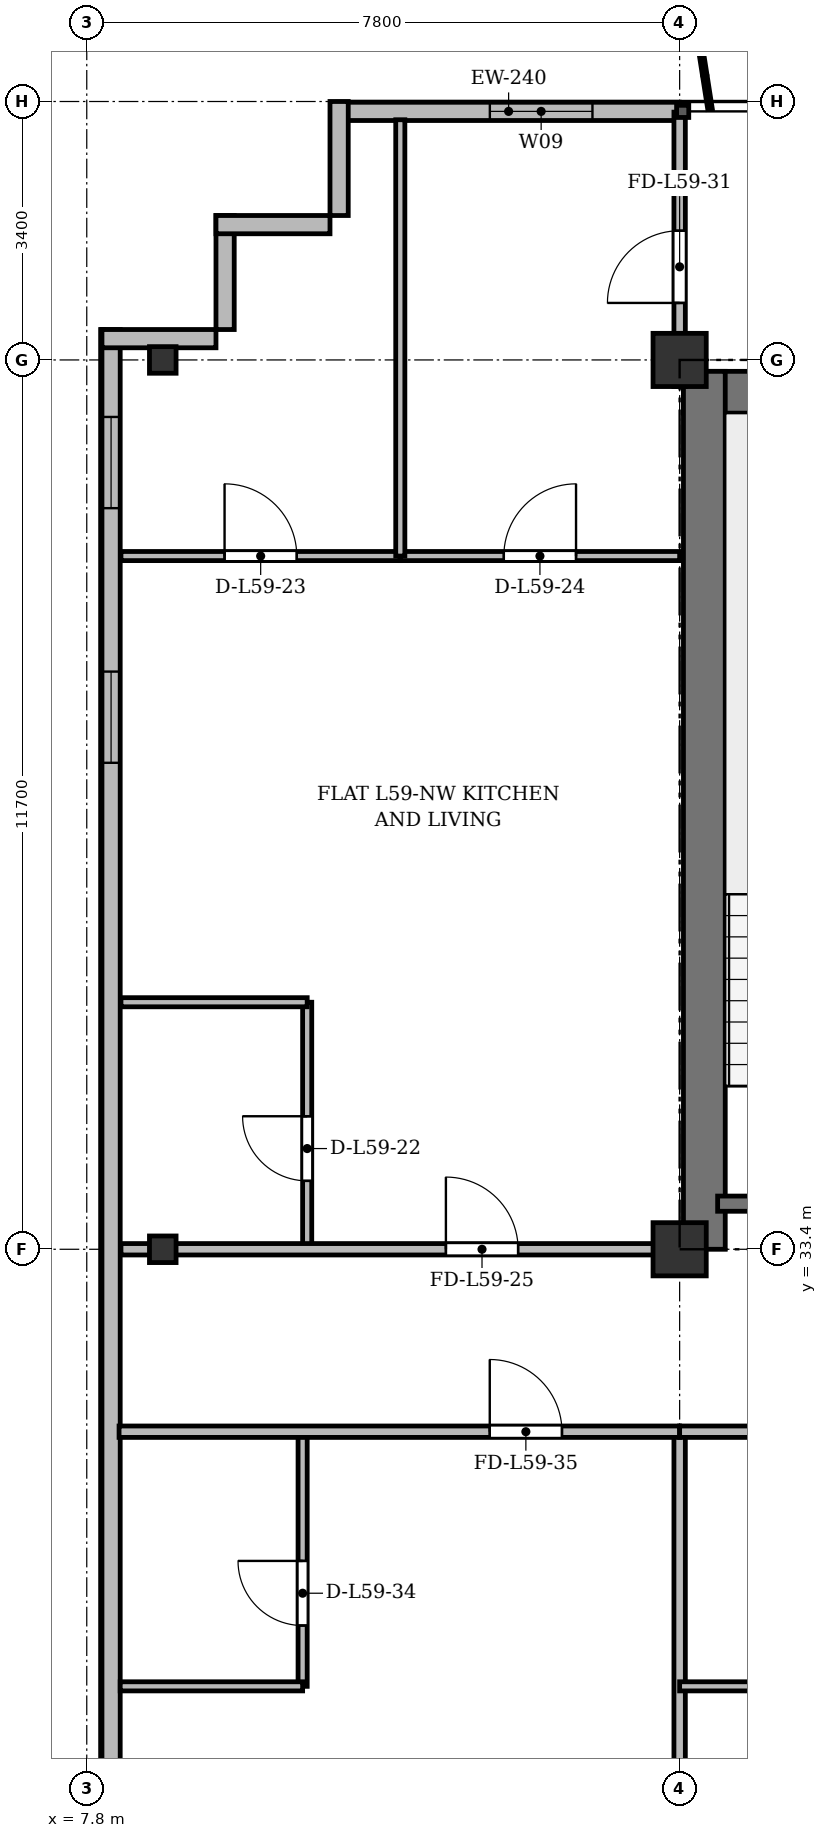
"""IFC4 building model, lengths in metres.
Left out: names, types, materials, properties, quantities, classifications, styles, units other than length and angle.
Written with IfcOpenShell. Run it as: python <this file> out.ifc"""

import sys

from ifc_helpers import new_model, si_unit, direction, frame, frame_2d, origin, origin_2d, place, context, subcontext, project, spatial, rectangle, i_section, extrude, source, transform, mapped, element, fill, save


model = new_model("IFC4")
c1 = context("Model", 3, precision=1e-05, world=origin(), true_north=direction((0.0, 1.0)))
c2 = subcontext(c1, "Body", "Model", "MODEL_VIEW")
j1 = project(units=[si_unit("LENGTHUNIT", "METRE"), si_unit("PLANEANGLEUNIT", "RADIAN")], contexts=[c1])
p1 = place(None, origin())
s1 = spatial("IfcSite", under=j1, at=p1, CompositionType="ELEMENT")
p2 = place(p1, origin())
s2 = spatial("IfcBuilding", under=s1, at=p2, CompositionType="ELEMENT")
p3 = place(p2, frame((0.0, 0.0, 226.5)))
s3 = spatial("IfcBuildingStorey", under=s2, at=p3, CompositionType="ELEMENT", Elevation=226.5)
m1 = source(origin(), c2, "Body", "SweptSolid", [
    extrude(i_section(OverallWidth=0.35, OverallDepth=0.35, WebThickness=0.018, FlangeThickness=0.028, at=origin_2d()), origin(), (0.0, 0.0, 1.0), 3.6),
])
for number, where, z_axis, x_axis in (
    (1, (8.8, 33.4, 0.0), (0.0, 0.0, 1.0), (1.0, 0.0, 0.0)),
    (2, (8.8, 45.1, 0.0), (0.0, 0.0, 1.0), (1.0, 0.0, 0.0)),
):
    element("IfcColumn", number, at=place(p3, frame(where, z_axis=z_axis, x_axis=x_axis)), inside=s3, PredefinedType="COLUMN", context=c2, shape_type="MappedRepresentation", body=[
        mapped(m1, transform((0.0, 0.0, 0.0), x_axis=(1.0, 0.0, 0.0), y_axis=(0.0, 1.0, 0.0), z_axis=(0.0, 0.0, 1.0), scale=1.0)),
    ])
m2 = source(origin(), c2, "Body", "SweptSolid", [
    extrude(rectangle(XDim=0.7, YDim=0.7, at=origin_2d()), origin(), (0.0, 0.0, 1.0), 3.6),
])
for number, where, z_axis, x_axis in (
    (3, (15.6, 33.4, 0.0), (0.0, 0.0, 1.0), (1.0, 0.0, 0.0)),
    (4, (15.6, 45.1, 0.0), (0.0, 0.0, 1.0), (1.0, 0.0, 0.0)),
):
    element("IfcColumn", number, at=place(p3, frame(where, z_axis=z_axis, x_axis=x_axis)), inside=s3, PredefinedType="COLUMN", context=c2, shape_type="MappedRepresentation", body=[
        mapped(m2, transform((0.0, 0.0, 0.0), x_axis=(1.0, 0.0, 0.0), y_axis=(0.0, 1.0, 0.0), z_axis=(0.0, 0.0, 1.0), scale=1.0)),
    ])
p4 = place(p3, frame((11.1, 48.37, 0.0), z_axis=(0.0, 0.0, 1.0), x_axis=(1.0, 0.0, 0.0)))
e5 = element("IfcWall", 5, at=p4, inside=s3, PredefinedType="SOLIDWALL", context=c2, shape_type="SweptSolid", body=[
    extrude(rectangle(XDim=4.5, YDim=0.24, at=frame_2d((2.25, 0.0))), origin(), (0.0, 0.0, 1.0), 3.36),
])
p5 = place(p4, frame((2.003, 0.0, 0.9)))
e6 = element("IfcOpeningElement", 6, at=p5, cuts=e5, PredefinedType="OPENING", context=c2, shape_type="SweptSolid", body=[
    extrude(rectangle(XDim=1.35, YDim=1.5, at=frame_2d((0.675, 0.75))), frame((0.0, 0.13, 0.0), z_axis=(0.0, -1.0, 0.0), x_axis=(1.0, 0.0, 0.0)), (0.0, 0.0, 1.0), 0.26),
])
p6 = place(p3, frame((8.12, 6.4, 0.0), z_axis=(0.0, 0.0, 1.0), x_axis=(0.0, 1.0, 0.0)))
e7 = element("IfcWall", 7, at=p6, inside=s3, PredefinedType="SOLIDWALL", context=c2, shape_type="SweptSolid", body=[
    extrude(rectangle(XDim=39.1, YDim=0.24, at=frame_2d((19.55, 0.0))), origin(), (0.0, 0.0, 1.0), 3.36),
])
p7 = place(p6, frame((1.45, 0.0, 0.92)))
e8 = element("IfcOpeningElement", 8, at=p7, cuts=e7, PredefinedType="OPENING", context=c2, shape_type="SweptSolid", body=[
    extrude(rectangle(XDim=1.2, YDim=1.65, at=frame_2d((0.6, 0.825))), frame((0.0, 0.13, 0.0), z_axis=(0.0, -1.0, 0.0), x_axis=(1.0, 0.0, 0.0)), (0.0, 0.0, 1.0), 0.26),
])
p8 = place(p6, frame((3.8, 0.0, 0.92)))
e9 = element("IfcOpeningElement", 9, at=p8, cuts=e7, PredefinedType="OPENING", context=c2, shape_type="SweptSolid", body=[
    extrude(rectangle(XDim=2.4, YDim=2.1, at=frame_2d((1.2, 1.05))), frame((0.0, 0.13, 0.0), z_axis=(0.0, -1.0, 0.0), x_axis=(1.0, 0.0, 0.0)), (0.0, 0.0, 1.0), 0.26),
])
p9 = place(p6, frame((8.0, 0.0, 0.92)))
e10 = element("IfcOpeningElement", 10, at=p9, cuts=e7, PredefinedType="OPENING", context=c2, shape_type="SweptSolid", body=[
    extrude(rectangle(XDim=2.4, YDim=2.1, at=frame_2d((1.2, 1.05))), frame((0.0, 0.13, 0.0), z_axis=(0.0, -1.0, 0.0), x_axis=(1.0, 0.0, 0.0)), (0.0, 0.0, 1.0), 0.26),
])
p10 = place(p6, frame((15.2, 0.0, 0.92)))
e11 = element("IfcOpeningElement", 11, at=p10, cuts=e7, PredefinedType="OPENING", context=c2, shape_type="SweptSolid", body=[
    extrude(rectangle(XDim=2.4, YDim=2.1, at=frame_2d((1.2, 1.05))), frame((0.0, 0.13, 0.0), z_axis=(0.0, -1.0, 0.0), x_axis=(1.0, 0.0, 0.0)), (0.0, 0.0, 1.0), 0.26),
])
p11 = place(p6, frame((33.4, 0.0, 0.92)))
e12 = element("IfcOpeningElement", 12, at=p11, cuts=e7, PredefinedType="OPENING", context=c2, shape_type="SweptSolid", body=[
    extrude(rectangle(XDim=1.2, YDim=1.65, at=frame_2d((0.6, 0.825))), frame((0.0, 0.13, 0.0), z_axis=(0.0, -1.0, 0.0), x_axis=(1.0, 0.0, 0.0)), (0.0, 0.0, 1.0), 0.26),
])
p12 = place(p6, frame((36.75, 0.0, 0.92)))
e13 = element("IfcOpeningElement", 13, at=p12, cuts=e7, PredefinedType="OPENING", context=c2, shape_type="SweptSolid", body=[
    extrude(rectangle(XDim=1.2, YDim=1.65, at=frame_2d((0.6, 0.825))), frame((0.0, 0.13, 0.0), z_axis=(0.0, -1.0, 0.0), x_axis=(1.0, 0.0, 0.0)), (0.0, 0.0, 1.0), 0.26),
])
for number, where, z_axis, x_axis in (
    (14, (8.0, 45.38, 0.0), (0.0, 0.0, 1.0), (1.0, 0.0, 0.0)),
    (15, (9.62, 45.5, 0.0), (0.0, 0.0, 1.0), (0.0, 1.0, 0.0)),
    (16, (9.5, 46.88, 0.0), (0.0, 0.0, 1.0), (1.0, 0.0, 0.0)),
    (17, (11.12, 47.0, 0.0), (0.0, 0.0, 1.0), (0.0, 1.0, 0.0)),
):
    element("IfcWall", number, at=place(p3, frame(where, z_axis=z_axis, x_axis=x_axis)), inside=s3, PredefinedType="SOLIDWALL", context=c2, shape_type="SweptSolid", body=[
        extrude(rectangle(XDim=1.5, YDim=0.24, at=frame_2d((0.75, 0.0))), origin(), (0.0, 0.0, 1.0), 3.36),
    ])
p13 = place(p3, frame((15.65, 44.675, 0.0), z_axis=(0.0, 0.0, 1.0), x_axis=(1.0, 0.0, 0.0)))
e18 = element("IfcWall", 18, at=p13, inside=s3, PredefinedType="SHEAR", context=c2, shape_type="SweptSolid", body=[
    extrude(rectangle(XDim=43.1, YDim=0.55, at=frame_2d((21.55, 0.0))), origin(), (0.0, 0.0, 1.0), 3.36),
])
p14 = place(p3, frame((15.925, 33.4, 0.0), z_axis=(0.0, 0.0, 1.0), x_axis=(0.0, 1.0, 0.0)))
e19 = element("IfcWall", 19, at=p14, inside=s3, PredefinedType="SHEAR", context=c2, shape_type="SweptSolid", body=[
    extrude(rectangle(XDim=11.55, YDim=0.55, at=frame_2d((5.775, 0.0))), origin(), (0.0, 0.0, 1.0), 3.36),
])
p15 = place(p3, frame((16.1, 34.0, 0.0), z_axis=(0.0, 0.0, 1.0), x_axis=(1.0, 0.0, 0.0)))
e20 = element("IfcWall", 20, at=p15, inside=s3, PredefinedType="SHEAR", context=c2, shape_type="SweptSolid", body=[
    extrude(rectangle(XDim=3.4, YDim=0.2, at=frame_2d((1.7, 0.0))), origin(), (0.0, 0.0, 1.0), 3.36),
])
p16 = place(p3, frame((10.7, 33.4, 0.0), z_axis=(0.0, 0.0, 1.0), x_axis=(0.0, 1.0, 0.0)))
e21 = element("IfcWall", 21, at=p16, inside=s3, PredefinedType="PARTITIONING", context=c2, shape_type="SweptSolid", body=[
    extrude(rectangle(XDim=3.25, YDim=0.12, at=frame_2d((1.625, 0.0))), origin(), (0.0, 0.0, 1.0), 2.91),
])
p17 = place(p16, frame((0.9, 0.0, 0.0)))
e22 = element("IfcOpeningElement", 22, at=p17, cuts=e21, PredefinedType="OPENING", context=c2, shape_type="SweptSolid", body=[
    extrude(rectangle(XDim=0.85, YDim=2.1, at=frame_2d((0.425, 1.05))), frame((0.0, 0.07, 0.0), z_axis=(0.0, -1.0, 0.0), x_axis=(1.0, 0.0, 0.0)), (0.0, 0.0, 1.0), 0.14),
])
p18 = place(p3, frame((8.25, 36.65, 0.0), z_axis=(0.0, 0.0, 1.0), x_axis=(1.0, 0.0, 0.0)))
e23 = element("IfcWall", 23, at=p18, inside=s3, PredefinedType="PARTITIONING", context=c2, shape_type="SweptSolid", body=[
    extrude(rectangle(XDim=2.45, YDim=0.12, at=frame_2d((1.225, 0.0))), origin(), (0.0, 0.0, 1.0), 2.86),
])
p19 = place(p3, frame((8.25, 42.52, 0.0), z_axis=(0.0, 0.0, 1.0), x_axis=(1.0, 0.0, 0.0)))
e24 = element("IfcWall", 24, at=p19, inside=s3, PredefinedType="PARTITIONING", context=c2, shape_type="SweptSolid", body=[
    extrude(rectangle(XDim=3.675, YDim=0.12, at=frame_2d((1.837, 0.0))), origin(), (0.0, 0.0, 1.0), 2.86),
])
p20 = place(p19, frame((1.363, 0.0, 0.0)))
e25 = element("IfcOpeningElement", 25, at=p20, cuts=e24, PredefinedType="OPENING", context=c2, shape_type="SweptSolid", body=[
    extrude(rectangle(XDim=0.95, YDim=2.15, at=frame_2d((0.475, 1.075))), frame((0.0, 0.07, 0.0), z_axis=(0.0, -1.0, 0.0), x_axis=(1.0, 0.0, 0.0)), (0.0, 0.0, 1.0), 0.14),
])
p21 = place(p3, frame((11.925, 42.52, 0.0), z_axis=(0.0, 0.0, 1.0), x_axis=(1.0, 0.0, 0.0)))
e26 = element("IfcWall", 26, at=p21, inside=s3, PredefinedType="PARTITIONING", context=c2, shape_type="SweptSolid", body=[
    extrude(rectangle(XDim=3.675, YDim=0.12, at=frame_2d((1.837, 0.0))), origin(), (0.0, 0.0, 1.0), 2.86),
])
p22 = place(p21, frame((1.362, 0.0, 0.0)))
e27 = element("IfcOpeningElement", 27, at=p22, cuts=e26, PredefinedType="OPENING", context=c2, shape_type="SweptSolid", body=[
    extrude(rectangle(XDim=0.95, YDim=2.15, at=frame_2d((0.475, 1.075))), frame((0.0, 0.07, 0.0), z_axis=(0.0, -1.0, 0.0), x_axis=(1.0, 0.0, 0.0)), (0.0, 0.0, 1.0), 0.14),
])
p23 = place(p3, frame((11.925, 42.52, 0.0), z_axis=(0.0, 0.0, 1.0), x_axis=(0.0, 1.0, 0.0)))
e28 = element("IfcWall", 28, at=p23, inside=s3, PredefinedType="PARTITIONING", context=c2, shape_type="SweptSolid", body=[
    extrude(rectangle(XDim=5.74, YDim=0.12, at=frame_2d((2.87, 0.0))), origin(), (0.0, 0.0, 1.0), 2.91),
])
p24 = place(p3, frame((8.25, 33.4, 0.0), z_axis=(0.0, 0.0, 1.0), x_axis=(1.0, 0.0, 0.0)))
e29 = element("IfcWall", 29, at=p24, inside=s3, PredefinedType="PARTITIONING", context=c2, shape_type="SweptSolid", body=[
    extrude(rectangle(XDim=7.35, YDim=0.15, at=frame_2d((3.675, 0.0))), origin(), (0.0, 0.0, 1.0), 2.91),
])
p25 = place(p24, frame((4.275, 0.0, 0.0)))
e30 = element("IfcOpeningElement", 30, at=p25, cuts=e29, PredefinedType="OPENING", context=c2, shape_type="SweptSolid", body=[
    extrude(rectangle(XDim=0.95, YDim=2.15, at=frame_2d((0.475, 1.075))), frame((0.0, 0.085, 0.0), z_axis=(0.0, -1.0, 0.0), x_axis=(1.0, 0.0, 0.0)), (0.0, 0.0, 1.0), 0.17),
])
p26 = place(p3, frame((15.6, 44.75, 0.0), z_axis=(0.0, 0.0, 1.0), x_axis=(0.0, 1.0, 0.0)))
e31 = element("IfcWall", 31, at=p26, inside=s3, PredefinedType="PARTITIONING", context=c2, shape_type="SweptSolid", body=[
    extrude(rectangle(XDim=3.61, YDim=0.15, at=frame_2d((1.805, 0.0))), origin(), (0.0, 0.0, 1.0), 2.86),
])
p27 = place(p26, frame((1.1, 0.0, 0.0)))
e32 = element("IfcOpeningElement", 32, at=p27, cuts=e31, PredefinedType="OPENING", context=c2, shape_type="SweptSolid", body=[
    extrude(rectangle(XDim=0.95, YDim=2.15, at=frame_2d((0.475, 1.075))), frame((0.0, 0.085, 0.0), z_axis=(0.0, -1.0, 0.0), x_axis=(1.0, 0.0, 0.0)), (0.0, 0.0, 1.0), 0.17),
])
p28 = place(p3, frame((15.6, 3.625, 0.0), z_axis=(0.0, 0.0, 1.0), x_axis=(0.0, 1.0, 0.0)))
e33 = element("IfcWall", 33, at=p28, inside=s3, PredefinedType="PARTITIONING", context=c2, shape_type="SweptSolid", body=[
    extrude(rectangle(XDim=27.375, YDim=0.15, at=frame_2d((13.688, 0.0))), origin(), (0.0, 0.0, 1.0), 2.86),
])
p29 = place(p3, frame((10.64, 27.65, 0.0), z_axis=(0.0, 0.0, 1.0), x_axis=(0.0, 1.0, 0.0)))
e34 = element("IfcWall", 34, at=p29, inside=s3, PredefinedType="PARTITIONING", context=c2, shape_type="SweptSolid", body=[
    extrude(rectangle(XDim=3.35, YDim=0.12, at=frame_2d((1.675, 0.0))), origin(), (0.0, 0.0, 1.0), 3.36),
])
p30 = place(p29, frame((0.8, 0.0, 0.0)))
e35 = element("IfcOpeningElement", 35, at=p30, cuts=e34, PredefinedType="OPENING", context=c2, shape_type="SweptSolid", body=[
    extrude(rectangle(XDim=0.85, YDim=2.1, at=frame_2d((0.425, 1.05))), frame((0.0, 0.07, 0.0), z_axis=(0.0, -1.0, 0.0), x_axis=(1.0, 0.0, 0.0)), (0.0, 0.0, 1.0), 0.14),
])
p31 = place(p3, frame((8.24, 27.65, 0.0), z_axis=(0.0, 0.0, 1.0), x_axis=(1.0, 0.0, 0.0)))
e36 = element("IfcWall", 36, at=p31, inside=s3, PredefinedType="PARTITIONING", context=c2, shape_type="SweptSolid", body=[
    extrude(rectangle(XDim=2.4, YDim=0.12, at=frame_2d((1.2, 0.0))), origin(), (0.0, 0.0, 1.0), 2.86),
])
p32 = place(p3, frame((8.225, 31.0, 0.0), z_axis=(0.0, 0.0, 1.0), x_axis=(1.0, 0.0, 0.0)))
e37 = element("IfcWall", 37, at=p32, inside=s3, PredefinedType="PARTITIONING", context=c2, shape_type="SweptSolid", body=[
    extrude(rectangle(XDim=7.375, YDim=0.15, at=frame_2d((3.688, 0.0))), origin(), (0.0, 0.0, 1.0), 2.86),
])
p33 = place(p32, frame((4.877, 0.0, 0.0)))
e38 = element("IfcOpeningElement", 38, at=p33, cuts=e37, PredefinedType="OPENING", context=c2, shape_type="SweptSolid", body=[
    extrude(rectangle(XDim=0.95, YDim=2.15, at=frame_2d((0.475, 1.075))), frame((0.0, 0.085, 0.0), z_axis=(0.0, -1.0, 0.0), x_axis=(1.0, 0.0, 0.0)), (0.0, 0.0, 1.0), 0.17),
])
p34 = place(p3, frame((15.6, 27.65, 0.0), z_axis=(0.0, 0.0, 1.0), x_axis=(1.0, 0.0, 0.0)))
e39 = element("IfcWall", 39, at=p34, inside=s3, PredefinedType="PARTITIONING", context=c2, shape_type="SweptSolid", body=[
    extrude(rectangle(XDim=2.4, YDim=0.12, at=frame_2d((1.2, 0.0))), origin(), (0.0, 0.0, 1.0), 2.86),
])
p35 = place(p3, frame((15.6, 31.0, 0.0), z_axis=(0.0, 0.0, 1.0), x_axis=(1.0, 0.0, 0.0)))
e40 = element("IfcWall", 40, at=p35, inside=s3, PredefinedType="PARTITIONING", context=c2, shape_type="SweptSolid", body=[
    extrude(rectangle(XDim=7.8, YDim=0.15, at=frame_2d((3.9, 0.0))), origin(), (0.0, 0.0, 1.0), 2.86),
])
p36 = place(p35, frame((5.172, 0.0, 0.0)))
e41 = element("IfcOpeningElement", 41, at=p36, cuts=e40, PredefinedType="OPENING", context=c2, shape_type="SweptSolid", body=[
    extrude(rectangle(XDim=0.95, YDim=2.15, at=frame_2d((0.475, 1.075))), frame((0.0, 0.085, 0.0), z_axis=(0.0, -1.0, 0.0), x_axis=(1.0, 0.0, 0.0)), (0.0, 0.0, 1.0), 0.17),
])
m3 = source(origin(), c2, "Body", "SweptSolid", [
    extrude(rectangle(XDim=1.35, YDim=1.5, at=frame_2d((0.675, 0.75))), frame((0.0, 0.03, 0.0), z_axis=(0.0, -1.0, 0.0), x_axis=(1.0, 0.0, 0.0)), (0.0, 0.0, 1.0), 0.06),
])
p37 = place(p5, origin())
e42 = element("IfcWindow", 42, at=p37, inside=s3, PartitioningType="SINGLE_PANEL", PredefinedType="WINDOW", context=c2, shape_type="MappedRepresentation", body=[
    mapped(m3, transform((0.0, 0.0, 0.0), x_axis=(1.0, 0.0, 0.0), y_axis=(0.0, 1.0, 0.0), z_axis=(0.0, 0.0, 1.0), scale=1.0)),
])
fill(e6, e42)
m4 = source(origin(), c2, "Body", "SweptSolid", [
    extrude(rectangle(XDim=1.2, YDim=1.65, at=frame_2d((0.6, 0.825))), frame((0.0, 0.03, 0.0), z_axis=(0.0, -1.0, 0.0), x_axis=(1.0, 0.0, 0.0)), (0.0, 0.0, 1.0), 0.06),
])
p38 = place(p11, origin())
e43 = element("IfcWindow", 43, at=p38, inside=s3, PartitioningType="SINGLE_PANEL", PredefinedType="WINDOW", context=c2, shape_type="MappedRepresentation", body=[
    mapped(m4, transform((0.0, 0.0, 0.0), x_axis=(1.0, 0.0, 0.0), y_axis=(0.0, 1.0, 0.0), z_axis=(0.0, 0.0, 1.0), scale=1.0)),
])
fill(e12, e43)
p39 = place(p12, origin())
e44 = element("IfcWindow", 44, at=p39, inside=s3, PartitioningType="SINGLE_PANEL", PredefinedType="WINDOW", context=c2, shape_type="MappedRepresentation", body=[
    mapped(m4, transform((0.0, 0.0, 0.0), x_axis=(1.0, 0.0, 0.0), y_axis=(0.0, 1.0, 0.0), z_axis=(0.0, 0.0, 1.0), scale=1.0)),
])
fill(e13, e44)
m5 = source(origin(), c2, "Body", "SweptSolid", [
    extrude(rectangle(XDim=0.85, YDim=2.1, at=frame_2d((0.425, 1.05))), frame((0.0, 0.025, 0.0), z_axis=(0.0, -1.0, 0.0), x_axis=(1.0, 0.0, 0.0)), (0.0, 0.0, 1.0), 0.05),
])
p40 = place(p17, origin())
e45 = element("IfcDoor", 45, at=p40, inside=s3, OperationType="SINGLE_SWING_RIGHT", PredefinedType="DOOR", context=c2, shape_type="MappedRepresentation", body=[
    mapped(m5, transform((0.0, 0.0, 0.0), x_axis=(1.0, 0.0, 0.0), y_axis=(0.0, 1.0, 0.0), z_axis=(0.0, 0.0, 1.0), scale=1.0)),
])
fill(e22, e45)
m6 = source(origin(), c2, "Body", "SweptSolid", [
    extrude(rectangle(XDim=0.95, YDim=2.15, at=frame_2d((0.475, 1.075))), frame((0.0, 0.025, 0.0), z_axis=(0.0, -1.0, 0.0), x_axis=(1.0, 0.0, 0.0)), (0.0, 0.0, 1.0), 0.05),
])
p41 = place(p20, origin())
e46 = element("IfcDoor", 46, at=p41, inside=s3, OperationType="SINGLE_SWING_LEFT", PredefinedType="DOOR", context=c2, shape_type="MappedRepresentation", body=[
    mapped(m6, transform((0.0, 0.0, 0.0), x_axis=(1.0, 0.0, 0.0), y_axis=(0.0, 1.0, 0.0), z_axis=(0.0, 0.0, 1.0), scale=1.0)),
])
fill(e25, e46)
p42 = place(p22, origin())
e47 = element("IfcDoor", 47, at=p42, inside=s3, OperationType="SINGLE_SWING_RIGHT", PredefinedType="DOOR", context=c2, shape_type="MappedRepresentation", body=[
    mapped(m6, transform((0.0, 0.0, 0.0), x_axis=(1.0, 0.0, 0.0), y_axis=(0.0, 1.0, 0.0), z_axis=(0.0, 0.0, 1.0), scale=1.0)),
])
fill(e27, e47)
p43 = place(p25, origin())
e48 = element("IfcDoor", 48, at=p43, inside=s3, OperationType="SINGLE_SWING_LEFT", PredefinedType="DOOR", context=c2, shape_type="MappedRepresentation", body=[
    mapped(m6, transform((0.0, 0.0, 0.0), x_axis=(1.0, 0.0, 0.0), y_axis=(0.0, 1.0, 0.0), z_axis=(0.0, 0.0, 1.0), scale=1.0)),
])
fill(e30, e48)
p44 = place(p27, origin())
e49 = element("IfcDoor", 49, at=p44, inside=s3, OperationType="SINGLE_SWING_LEFT", PredefinedType="DOOR", context=c2, shape_type="MappedRepresentation", body=[
    mapped(m6, transform((0.0, 0.0, 0.0), x_axis=(1.0, 0.0, 0.0), y_axis=(0.0, 1.0, 0.0), z_axis=(0.0, 0.0, 1.0), scale=1.0)),
])
fill(e32, e49)
p45 = place(p30, origin())
e50 = element("IfcDoor", 50, at=p45, inside=s3, OperationType="SINGLE_SWING_RIGHT", PredefinedType="DOOR", context=c2, shape_type="MappedRepresentation", body=[
    mapped(m5, transform((0.0, 0.0, 0.0), x_axis=(1.0, 0.0, 0.0), y_axis=(0.0, 1.0, 0.0), z_axis=(0.0, 0.0, 1.0), scale=1.0)),
])
fill(e35, e50)
p46 = place(p33, origin())
e51 = element("IfcDoor", 51, at=p46, inside=s3, OperationType="SINGLE_SWING_LEFT", PredefinedType="DOOR", context=c2, shape_type="MappedRepresentation", body=[
    mapped(m6, transform((0.0, 0.0, 0.0), x_axis=(1.0, 0.0, 0.0), y_axis=(0.0, 1.0, 0.0), z_axis=(0.0, 0.0, 1.0), scale=1.0)),
])
fill(e38, e51)
save(model, sys.argv[1])
